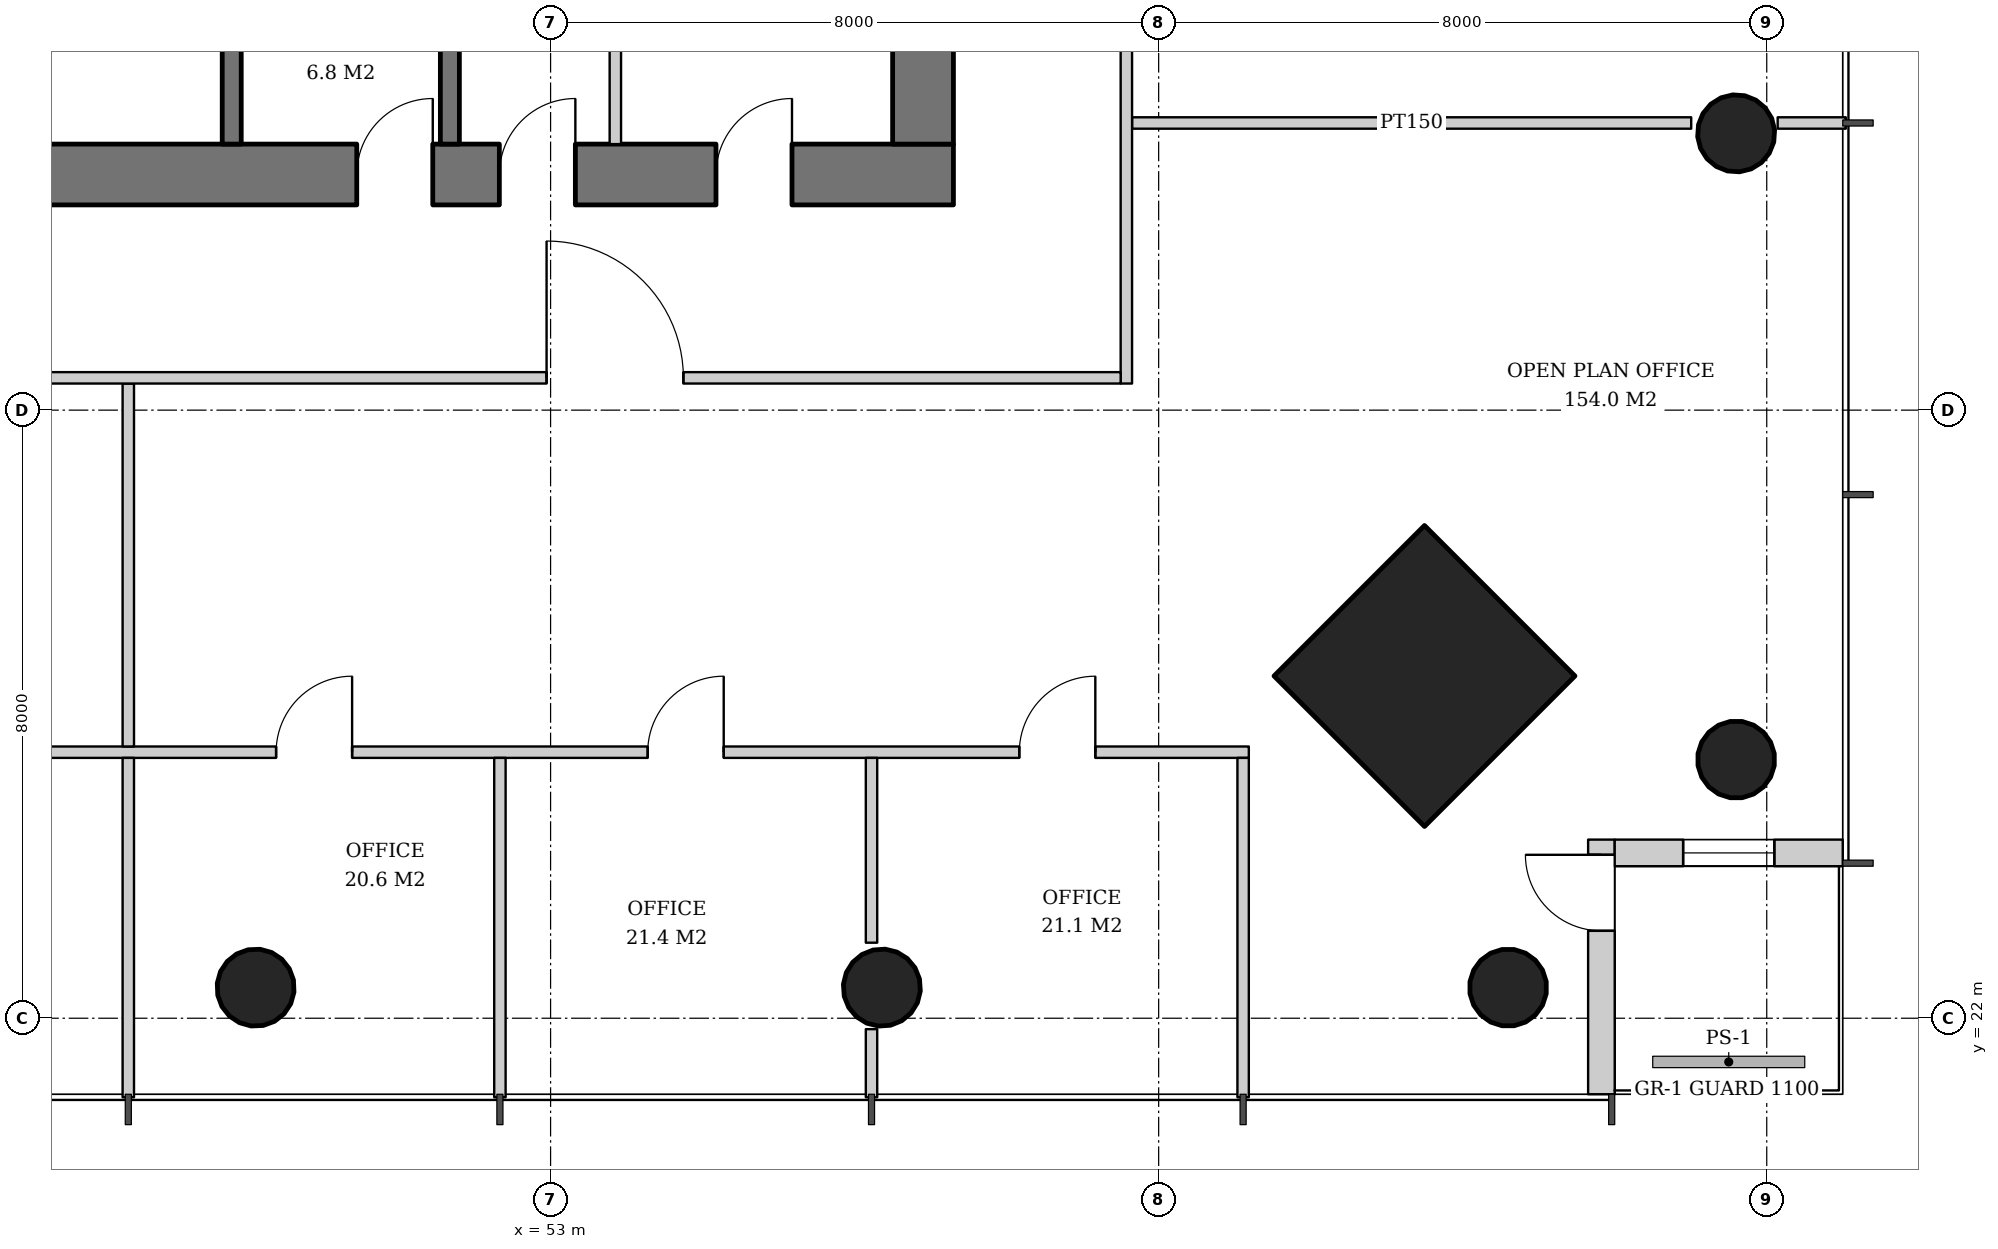
"""IFC4 building model, lengths in metres.
Left out: names, types, materials, properties, quantities, classifications, styles, units other than length and angle.
Written with IfcOpenShell. Run it as: python <this file> out.ifc"""

import sys

from ifc_helpers import new_model, si_unit, direction, frame, frame_2d, origin, origin_2d, place, context, subcontext, project, spatial, rectangle, hollow_circle, extrude, element, fill, save


model = new_model("IFC4")
c1 = context("Model", 3, precision=1e-05, world=origin(), true_north=direction((0.0, 1.0)))
c2 = subcontext(c1, "Body", "Model", "MODEL_VIEW")
j1 = project(units=[si_unit("LENGTHUNIT", "METRE"), si_unit("PLANEANGLEUNIT", "RADIAN")], contexts=[c1])
p1 = place(None, origin())
s1 = spatial("IfcSite", under=j1, at=p1, CompositionType="ELEMENT")
p2 = place(p1, origin())
s2 = spatial("IfcBuilding", under=s1, at=p2, CompositionType="ELEMENT")
p3 = place(p2, frame((0.0, 0.0, 32.4)))
s3 = spatial("IfcBuildingStorey", under=s2, at=p3, CompositionType="ELEMENT", Elevation=32.4)
p4 = place(p3, frame((68.636, 25.364, 0.0), z_axis=(-0.031898107953, 0.031898107953, 0.998981992539), x_axis=(-0.707106781187, -0.707106781187, 0.0)))
e1 = element("IfcColumn", 1, at=p4, inside=s3, PredefinedType="COLUMN", context=c2, shape_type="SweptSolid", body=[
    extrude(hollow_circle(Radius=0.508, WallThickness=0.04, at=origin_2d()), origin(), (0.0, 0.0, 1.0), 3.804),
])
p5 = place(p3, frame((68.636, 33.619, 0.0), z_axis=(-0.031908506785, 0.019132263625, 0.999307662176), x_axis=(-0.514241961696, -0.857645150882, 0.0)))
e2 = element("IfcColumn", 2, at=p5, inside=s3, PredefinedType="COLUMN", context=c2, shape_type="SweptSolid", body=[
    extrude(hollow_circle(Radius=0.508, WallThickness=0.04, at=origin_2d()), origin(), (0.0, 0.0, 1.0), 3.803),
])
p6 = place(p3, frame((64.536, 26.464, 0.0), z_axis=(-0.031898107953, 0.031898107953, 0.998981992539), x_axis=(-0.707106781187, -0.707106781187, 0.0)))
e3 = element("IfcColumn", 3, at=p6, inside=s3, PredefinedType="COLUMN", context=c2, shape_type="SweptSolid", body=[
    extrude(rectangle(XDim=2.8, YDim=2.8, at=origin_2d()), origin(), (0.0, 0.0, 1.0), 3.804),
])
p7 = place(p3, frame((65.636, 22.364, 0.0), z_axis=(-0.031898107953, 0.031898107953, 0.998981992539), x_axis=(-0.707106781187, -0.707106781187, 0.0)))
e4 = element("IfcColumn", 4, at=p7, inside=s3, PredefinedType="COLUMN", context=c2, shape_type="SweptSolid", body=[
    extrude(hollow_circle(Radius=0.508, WallThickness=0.04, at=origin_2d()), origin(), (0.0, 0.0, 1.0), 3.804),
])
p8 = place(p3, frame((49.127, 22.364, 0.0), z_axis=(-0.006421265669, 0.031913690376, 0.999470001408), x_axis=(-0.980352414563, -0.197254006954, 0.0)))
e5 = element("IfcColumn", 5, at=p8, inside=s3, PredefinedType="COLUMN", context=c2, shape_type="SweptSolid", body=[
    extrude(hollow_circle(Radius=0.508, WallThickness=0.04, at=origin_2d()), origin(), (0.0, 0.0, 1.0), 3.802),
])
p9 = place(p3, frame((57.381, 22.364, 0.0), z_axis=(-0.019132263625, 0.031908506785, 0.999307662176), x_axis=(-0.857645150882, -0.514241961696, 0.0)))
e6 = element("IfcColumn", 6, at=p9, inside=s3, PredefinedType="COLUMN", context=c2, shape_type="SweptSolid", body=[
    extrude(hollow_circle(Radius=0.508, WallThickness=0.04, at=origin_2d()), origin(), (0.0, 0.0, 1.0), 3.803),
])
p10 = place(p3, frame((31.7, 33.1, 0.0), z_axis=(0.0, 0.0, 1.0), x_axis=(1.0, 0.0, 0.0)))
e7 = element("IfcWall", 7, at=p10, inside=s3, PredefinedType="SHEAR", context=c2, shape_type="SweptSolid", body=[
    extrude(rectangle(XDim=26.6, YDim=0.8, at=frame_2d((13.3, 0.0))), origin(), (0.0, 0.0, 1.0), 3.8),
])
p11 = place(p10, frame((7.3, 0.0, 0.0)))
e8 = element("IfcOpeningElement", 8, at=p11, cuts=e7, PredefinedType="OPENING", context=c2, shape_type="SweptSolid", body=[
    extrude(rectangle(XDim=1.0, YDim=2.1, at=frame_2d((0.5, 1.05))), frame((0.0, 0.41, 0.0), z_axis=(0.0, -1.0, 0.0), x_axis=(1.0, 0.0, 0.0)), (0.0, 0.0, 1.0), 0.82),
])
p12 = place(p10, frame((18.75, 0.0, 0.0)))
e9 = element("IfcOpeningElement", 9, at=p12, cuts=e7, PredefinedType="OPENING", context=c2, shape_type="SweptSolid", body=[
    extrude(rectangle(XDim=1.0, YDim=2.1, at=frame_2d((0.5, 1.05))), frame((0.0, 0.41, 0.0), z_axis=(0.0, -1.0, 0.0), x_axis=(1.0, 0.0, 0.0)), (0.0, 0.0, 1.0), 0.82),
])
p13 = place(p10, frame((1.9, 0.0, 0.0)))
e10 = element("IfcOpeningElement", 10, at=p13, cuts=e7, PredefinedType="OPENING", context=c2, shape_type="SweptSolid", body=[
    extrude(rectangle(XDim=1.0, YDim=2.1, at=frame_2d((0.5, 1.05))), frame((0.0, 0.41, 0.0), z_axis=(0.0, -1.0, 0.0), x_axis=(1.0, 0.0, 0.0)), (0.0, 0.0, 1.0), 0.82),
])
p14 = place(p10, frame((4.725, 0.0, 0.0)))
e11 = element("IfcOpeningElement", 11, at=p14, cuts=e7, PredefinedType="OPENING", context=c2, shape_type="SweptSolid", body=[
    extrude(rectangle(XDim=1.0, YDim=2.1, at=frame_2d((0.5, 1.05))), frame((0.0, 0.41, 0.0), z_axis=(0.0, -1.0, 0.0), x_axis=(1.0, 0.0, 0.0)), (0.0, 0.0, 1.0), 0.82),
])
p15 = place(p10, frame((12.44, 0.0, 0.0)))
e12 = element("IfcOpeningElement", 12, at=p15, cuts=e7, PredefinedType="OPENING", context=c2, shape_type="SweptSolid", body=[
    extrude(rectangle(XDim=1.0, YDim=2.1, at=frame_2d((0.5, 1.05))), frame((0.0, 0.41, 0.0), z_axis=(0.0, -1.0, 0.0), x_axis=(1.0, 0.0, 0.0)), (0.0, 0.0, 1.0), 0.82),
])
p16 = place(p10, frame((20.626, 0.0, 0.0)))
e13 = element("IfcOpeningElement", 13, at=p16, cuts=e7, PredefinedType="OPENING", context=c2, shape_type="SweptSolid", body=[
    extrude(rectangle(XDim=1.0, YDim=2.1, at=frame_2d((0.5, 1.05))), frame((0.0, 0.41, 0.0), z_axis=(0.0, -1.0, 0.0), x_axis=(1.0, 0.0, 0.0)), (0.0, 0.0, 1.0), 0.82),
])
p17 = place(p10, frame((23.476, 0.0, 0.0)))
e14 = element("IfcOpeningElement", 14, at=p17, cuts=e7, PredefinedType="OPENING", context=c2, shape_type="SweptSolid", body=[
    extrude(rectangle(XDim=1.0, YDim=2.1, at=frame_2d((0.5, 1.05))), frame((0.0, 0.41, 0.0), z_axis=(0.0, -1.0, 0.0), x_axis=(1.0, 0.0, 0.0)), (0.0, 0.0, 1.0), 0.82),
])
p18 = place(p3, frame((57.9, 33.5, 0.0), z_axis=(0.0, 0.0, 1.0), x_axis=(0.0, 1.0, 0.0)))
e15 = element("IfcWall", 15, at=p18, inside=s3, PredefinedType="SHEAR", context=c2, shape_type="SweptSolid", body=[
    extrude(rectangle(XDim=25.0, YDim=0.8, at=frame_2d((12.5, 0.0))), origin(), (0.0, 0.0, 1.0), 3.8),
])
p19 = place(p18, frame((11.6, 0.0, 0.0)))
e16 = element("IfcOpeningElement", 16, at=p19, cuts=e15, PredefinedType="OPENING", context=c2, shape_type="SweptSolid", body=[
    extrude(rectangle(XDim=1.8, YDim=2.4, at=frame_2d((0.9, 1.2))), frame((0.0, 0.41, 0.0), z_axis=(0.0, -1.0, 0.0), x_axis=(1.0, 0.0, 0.0)), (0.0, 0.0, 1.0), 0.82),
])
p20 = place(p3, frame((66.825, 21.0, 0.0), z_axis=(0.0, 0.0, 1.0), x_axis=(0.0, 1.0, 0.0)))
e17 = element("IfcWall", 17, at=p20, inside=s3, PredefinedType="SOLIDWALL", context=c2, shape_type="SweptSolid", body=[
    extrude(rectangle(XDim=3.35, YDim=0.35, at=frame_2d((1.675, 0.0))), origin(), (0.0, 0.0, 1.0), 3.62),
])
p21 = place(p20, frame((2.15, 0.0, 0.0)))
e18 = element("IfcOpeningElement", 18, at=p21, cuts=e17, PredefinedType="OPENING", context=c2, shape_type="SweptSolid", body=[
    extrude(rectangle(XDim=1.0, YDim=2.4, at=frame_2d((0.5, 1.2))), frame((0.0, 0.185, 0.0), z_axis=(0.0, -1.0, 0.0), x_axis=(1.0, 0.0, 0.0)), (0.0, 0.0, 1.0), 0.37),
])
p22 = place(p3, frame((67.0, 24.175, 0.0), z_axis=(0.0, 0.0, 1.0), x_axis=(1.0, 0.0, 0.0)))
e19 = element("IfcWall", 19, at=p22, inside=s3, PredefinedType="SOLIDWALL", context=c2, shape_type="SweptSolid", body=[
    extrude(rectangle(XDim=3.0, YDim=0.35, at=frame_2d((1.5, 0.0))), origin(), (0.0, 0.0, 1.0), 3.62),
])
p23 = place(p22, frame((0.9, 0.0, 0.6)))
e20 = element("IfcOpeningElement", 20, at=p23, cuts=e19, PredefinedType="OPENING", context=c2, shape_type="SweptSolid", body=[
    extrude(rectangle(XDim=1.2, YDim=2.55, at=frame_2d((0.6, 1.275))), frame((0.0, 0.185, 0.0), z_axis=(0.0, -1.0, 0.0), x_axis=(1.0, 0.0, 0.0)), (0.0, 0.0, 1.0), 0.37),
])
for number, where, z_axis, x_axis in (
    (21, (48.805, 33.5, 0.0), (0.0, 0.0, 1.0), (0.0, 1.0, 0.0)),
    (22, (51.675, 33.5, 0.0), (0.0, 0.0, 1.0), (0.0, 1.0, 0.0)),
):
    element("IfcWall", number, at=place(p3, frame(where, z_axis=z_axis, x_axis=x_axis)), inside=s3, PredefinedType="SOLIDWALL", context=c2, shape_type="SweptSolid", body=[
        extrude(rectangle(XDim=2.6, YDim=0.25, at=frame_2d((1.3, 0.0))), origin(), (0.0, 0.0, 1.0), 3.62),
    ])
p24 = place(p3, frame((53.852, 33.5, 0.0), z_axis=(0.0, 0.0, 1.0), x_axis=(0.0, 1.0, 0.0)))
e23 = element("IfcWall", 23, at=p24, inside=s3, PredefinedType="SOLIDWALL", context=c2, shape_type="SweptSolid", body=[
    extrude(rectangle(XDim=2.6, YDim=0.15, at=frame_2d((1.3, 0.0))), origin(), (0.0, 0.0, 1.0), 3.62),
])
p25 = place(p3, frame((27.814, 25.5, 0.0), z_axis=(0.0, 0.0, 1.0), x_axis=(1.0, 0.0, 0.0)))
e24 = element("IfcWall", 24, at=p25, inside=s3, PredefinedType="PARTITIONING", context=c2, shape_type="SweptSolid", body=[
    extrude(rectangle(XDim=34.372, YDim=0.15, at=frame_2d((17.186, 0.0))), origin(), (0.0, 0.0, 1.0), 2.612),
])
p26 = place(p25, frame((2.02, 0.0, 0.0)))
e25 = element("IfcOpeningElement", 25, at=p26, cuts=e24, PredefinedType="OPENING", context=c2, shape_type="SweptSolid", body=[
    extrude(rectangle(XDim=1.0, YDim=2.1, at=frame_2d((0.5, 1.05))), frame((0.0, 0.085, 0.0), z_axis=(0.0, -1.0, 0.0), x_axis=(1.0, 0.0, 0.0)), (0.0, 0.0, 1.0), 0.17),
])
p27 = place(p25, frame((6.908, 0.0, 0.0)))
e26 = element("IfcOpeningElement", 26, at=p27, cuts=e24, PredefinedType="OPENING", context=c2, shape_type="SweptSolid", body=[
    extrude(rectangle(XDim=1.0, YDim=2.1, at=frame_2d((0.5, 1.05))), frame((0.0, 0.085, 0.0), z_axis=(0.0, -1.0, 0.0), x_axis=(1.0, 0.0, 0.0)), (0.0, 0.0, 1.0), 0.17),
])
p28 = place(p25, frame((11.797, 0.0, 0.0)))
e27 = element("IfcOpeningElement", 27, at=p28, cuts=e24, PredefinedType="OPENING", context=c2, shape_type="SweptSolid", body=[
    extrude(rectangle(XDim=1.0, YDim=2.1, at=frame_2d((0.5, 1.05))), frame((0.0, 0.085, 0.0), z_axis=(0.0, -1.0, 0.0), x_axis=(1.0, 0.0, 0.0)), (0.0, 0.0, 1.0), 0.17),
])
p29 = place(p25, frame((16.686, 0.0, 0.0)))
e28 = element("IfcOpeningElement", 28, at=p29, cuts=e24, PredefinedType="OPENING", context=c2, shape_type="SweptSolid", body=[
    extrude(rectangle(XDim=1.0, YDim=2.1, at=frame_2d((0.5, 1.05))), frame((0.0, 0.085, 0.0), z_axis=(0.0, -1.0, 0.0), x_axis=(1.0, 0.0, 0.0)), (0.0, 0.0, 1.0), 0.17),
])
p30 = place(p25, frame((21.575, 0.0, 0.0)))
e29 = element("IfcOpeningElement", 29, at=p30, cuts=e24, PredefinedType="OPENING", context=c2, shape_type="SweptSolid", body=[
    extrude(rectangle(XDim=1.0, YDim=2.1, at=frame_2d((0.5, 1.05))), frame((0.0, 0.085, 0.0), z_axis=(0.0, -1.0, 0.0), x_axis=(1.0, 0.0, 0.0)), (0.0, 0.0, 1.0), 0.17),
])
p31 = place(p25, frame((26.464, 0.0, 0.0)))
e30 = element("IfcOpeningElement", 30, at=p31, cuts=e24, PredefinedType="OPENING", context=c2, shape_type="SweptSolid", body=[
    extrude(rectangle(XDim=1.0, YDim=2.1, at=frame_2d((0.5, 1.05))), frame((0.0, 0.085, 0.0), z_axis=(0.0, -1.0, 0.0), x_axis=(1.0, 0.0, 0.0)), (0.0, 0.0, 1.0), 0.17),
])
p32 = place(p25, frame((31.353, 0.0, 0.0)))
e31 = element("IfcOpeningElement", 31, at=p32, cuts=e24, PredefinedType="OPENING", context=c2, shape_type="SweptSolid", body=[
    extrude(rectangle(XDim=1.0, YDim=2.1, at=frame_2d((0.5, 1.05))), frame((0.0, 0.085, 0.0), z_axis=(0.0, -1.0, 0.0), x_axis=(1.0, 0.0, 0.0)), (0.0, 0.0, 1.0), 0.17),
])
p33 = place(p3, frame((47.444, 25.425, 0.0), z_axis=(0.0, 0.0, 1.0), x_axis=(0.0, -1.0, 0.0)))
e32 = element("IfcWall", 32, at=p33, inside=s3, PredefinedType="PARTITIONING", context=c2, shape_type="SweptSolid", body=[
    extrude(rectangle(XDim=4.465, YDim=0.15, at=frame_2d((2.232, 0.0))), origin(), (0.0, 0.0, 1.0), 3.02),
])
p34 = place(p3, frame((52.333, 25.425, 0.0), z_axis=(0.0, 0.0, 1.0), x_axis=(0.0, -1.0, 0.0)))
e33 = element("IfcWall", 33, at=p34, inside=s3, PredefinedType="PARTITIONING", context=c2, shape_type="SweptSolid", body=[
    extrude(rectangle(XDim=4.465, YDim=0.15, at=frame_2d((2.232, 0.0))), origin(), (0.0, 0.0, 1.0), 2.85),
])
p35 = place(p3, frame((57.222, 25.425, 0.0), z_axis=(0.0, 0.0, 1.0), x_axis=(0.0, -1.0, 0.0)))
e34 = element("IfcWall", 34, at=p35, inside=s3, PredefinedType="PARTITIONING", context=c2, shape_type="SweptSolid", body=[
    extrude(rectangle(XDim=2.431, YDim=0.15, at=frame_2d((1.216, 0.0))), origin(), (0.0, 0.0, 1.0), 3.62),
])
p36 = place(p3, frame((57.222, 21.856, 0.0), z_axis=(0.0, 0.0, 1.0), x_axis=(0.0, -1.0, 0.0)))
e35 = element("IfcWall", 35, at=p36, inside=s3, PredefinedType="PARTITIONING", context=c2, shape_type="SweptSolid", body=[
    extrude(rectangle(XDim=0.896, YDim=0.15, at=frame_2d((0.448, 0.0))), origin(), (0.0, 0.0, 1.0), 3.62),
])
p37 = place(p3, frame((62.111, 25.425, 0.0), z_axis=(0.0, 0.0, 1.0), x_axis=(0.0, -1.0, 0.0)))
e36 = element("IfcWall", 36, at=p37, inside=s3, PredefinedType="PARTITIONING", context=c2, shape_type="SweptSolid", body=[
    extrude(rectangle(XDim=4.465, YDim=0.15, at=frame_2d((2.232, 0.0))), origin(), (0.0, 0.0, 1.0), 3.02),
])
p38 = place(p3, frame((60.65, 33.778, 0.0), z_axis=(0.0, 0.0, 1.0), x_axis=(1.0, 0.0, 0.0)))
e37 = element("IfcWall", 37, at=p38, inside=s3, PredefinedType="PARTITIONING", context=c2, shape_type="SweptSolid", body=[
    extrude(rectangle(XDim=7.356, YDim=0.15, at=frame_2d((3.678, 0.0))), origin(), (0.0, 0.0, 1.0), 3.62),
])
p39 = place(p3, frame((69.144, 33.778, 0.0), z_axis=(0.0, 0.0, 1.0), x_axis=(1.0, 0.0, 0.0)))
e38 = element("IfcWall", 38, at=p39, inside=s3, PredefinedType="PARTITIONING", context=c2, shape_type="SweptSolid", body=[
    extrude(rectangle(XDim=0.896, YDim=0.15, at=frame_2d((0.448, 0.0))), origin(), (0.0, 0.0, 1.0), 3.62),
])
p40 = place(p3, frame((47.444, 30.35, 0.0), z_axis=(0.0, 0.0, 1.0), x_axis=(0.0, -1.0, 0.0)))
e39 = element("IfcWall", 39, at=p40, inside=s3, PredefinedType="PARTITIONING", context=c2, shape_type="SweptSolid", body=[
    extrude(rectangle(XDim=4.775, YDim=0.15, at=frame_2d((2.388, 0.0))), origin(), (0.0, 0.0, 1.0), 3.62),
])
p41 = place(p3, frame((60.575, 30.35, 0.0), z_axis=(0.0, 0.0, 1.0), x_axis=(0.0, 1.0, 0.0)))
e40 = element("IfcWall", 40, at=p41, inside=s3, PredefinedType="PARTITIONING", context=c2, shape_type="SweptSolid", body=[
    extrude(rectangle(XDim=31.15, YDim=0.15, at=frame_2d((15.575, 0.0))), origin(), (0.0, 0.0, 1.0), 2.612),
])
p42 = place(p41, frame((16.264, 0.0, 0.0)))
e41 = element("IfcOpeningElement", 41, at=p42, cuts=e40, PredefinedType="OPENING", context=c2, shape_type="SweptSolid", body=[
    extrude(rectangle(XDim=1.8, YDim=2.4, at=frame_2d((0.9, 1.2))), frame((0.0, 0.085, 0.0), z_axis=(0.0, -1.0, 0.0), x_axis=(1.0, 0.0, 0.0)), (0.0, 0.0, 1.0), 0.17),
])
p43 = place(p3, frame((29.35, 30.425, 0.0), z_axis=(0.0, 0.0, 1.0), x_axis=(1.0, 0.0, 0.0)))
e42 = element("IfcWall", 42, at=p43, inside=s3, PredefinedType="PARTITIONING", context=c2, shape_type="SweptSolid", body=[
    extrude(rectangle(XDim=31.15, YDim=0.15, at=frame_2d((15.575, 0.0))), origin(), (0.0, 0.0, 1.0), 2.612),
])
p44 = place(p43, frame((23.597, 0.0, 0.0)))
e43 = element("IfcOpeningElement", 43, at=p44, cuts=e42, PredefinedType="OPENING", context=c2, shape_type="SweptSolid", body=[
    extrude(rectangle(XDim=1.8, YDim=2.4, at=frame_2d((0.9, 1.2))), frame((0.0, 0.085, 0.0), z_axis=(0.0, -1.0, 0.0), x_axis=(1.0, 0.0, 0.0)), (0.0, 0.0, 1.0), 0.17),
])
p45 = place(p21, origin())
e44 = element("IfcDoor", 44, at=p45, inside=s3, OperationType="SINGLE_SWING_RIGHT", PredefinedType="DOOR", context=c2, shape_type="SweptSolid", body=[
    extrude(rectangle(XDim=1.0, YDim=2.4, at=frame_2d((0.5, 1.2))), frame((0.0, 0.025, 0.0), z_axis=(0.0, -1.0, 0.0), x_axis=(1.0, 0.0, 0.0)), (0.0, 0.0, 1.0), 0.05),
])
fill(e18, e44)
p46 = place(p23, origin())
e45 = element("IfcWindow", 45, at=p46, inside=s3, PartitioningType="SINGLE_PANEL", PredefinedType="WINDOW", context=c2, shape_type="SweptSolid", body=[
    extrude(rectangle(XDim=1.2, YDim=2.55, at=frame_2d((0.6, 1.275))), frame((0.0, 0.03, 0.0), z_axis=(0.0, -1.0, 0.0), x_axis=(1.0, 0.0, 0.0)), (0.0, 0.0, 1.0), 0.06),
])
fill(e20, e45)
p47 = place(p12, origin())
e46 = element("IfcDoor", 46, at=p47, inside=s3, OperationType="SINGLE_SWING_RIGHT", PredefinedType="DOOR", context=c2, shape_type="SweptSolid", body=[
    extrude(rectangle(XDim=1.0, YDim=2.1, at=frame_2d((0.5, 1.05))), frame((0.0, 0.025, 0.0), z_axis=(0.0, -1.0, 0.0), x_axis=(1.0, 0.0, 0.0)), (0.0, 0.0, 1.0), 0.05),
])
fill(e9, e46)
p48 = place(p16, origin())
e47 = element("IfcDoor", 47, at=p48, inside=s3, OperationType="SINGLE_SWING_RIGHT", PredefinedType="DOOR", context=c2, shape_type="SweptSolid", body=[
    extrude(rectangle(XDim=1.0, YDim=2.1, at=frame_2d((0.5, 1.05))), frame((0.0, 0.39, 0.0), z_axis=(0.0, -1.0, 0.0), x_axis=(1.0, 0.0, 0.0)), (0.0, 0.0, 1.0), 0.05),
])
fill(e13, e47)
p49 = place(p17, origin())
e48 = element("IfcDoor", 48, at=p49, inside=s3, OperationType="SINGLE_SWING_RIGHT", PredefinedType="DOOR", context=c2, shape_type="SweptSolid", body=[
    extrude(rectangle(XDim=1.0, YDim=2.1, at=frame_2d((0.5, 1.05))), frame((0.0, 0.39, 0.0), z_axis=(0.0, -1.0, 0.0), x_axis=(1.0, 0.0, 0.0)), (0.0, 0.0, 1.0), 0.05),
])
fill(e14, e48)
p50 = place(p30, origin())
e49 = element("IfcDoor", 49, at=p50, inside=s3, OperationType="SINGLE_SWING_RIGHT", PredefinedType="DOOR", context=c2, shape_type="SweptSolid", body=[
    extrude(rectangle(XDim=1.0, YDim=2.1, at=frame_2d((0.5, 1.05))), frame((0.0, 0.025, 0.0), z_axis=(0.0, -1.0, 0.0), x_axis=(1.0, 0.0, 0.0)), (0.0, 0.0, 1.0), 0.05),
])
fill(e29, e49)
p51 = place(p31, origin())
e50 = element("IfcDoor", 50, at=p51, inside=s3, OperationType="SINGLE_SWING_RIGHT", PredefinedType="DOOR", context=c2, shape_type="SweptSolid", body=[
    extrude(rectangle(XDim=1.0, YDim=2.1, at=frame_2d((0.5, 1.05))), frame((0.0, 0.025, 0.0), z_axis=(0.0, -1.0, 0.0), x_axis=(1.0, 0.0, 0.0)), (0.0, 0.0, 1.0), 0.05),
])
fill(e30, e50)
p52 = place(p32, origin())
e51 = element("IfcDoor", 51, at=p52, inside=s3, OperationType="SINGLE_SWING_RIGHT", PredefinedType="DOOR", context=c2, shape_type="SweptSolid", body=[
    extrude(rectangle(XDim=1.0, YDim=2.1, at=frame_2d((0.5, 1.05))), frame((0.0, 0.025, 0.0), z_axis=(0.0, -1.0, 0.0), x_axis=(1.0, 0.0, 0.0)), (0.0, 0.0, 1.0), 0.05),
])
fill(e31, e51)
p53 = place(p44, origin())
e52 = element("IfcDoor", 52, at=p53, inside=s3, OperationType="DOUBLE_DOOR_SINGLE_SWING", PredefinedType="DOOR", context=c2, shape_type="SweptSolid", body=[
    extrude(rectangle(XDim=1.8, YDim=2.4, at=frame_2d((0.9, 1.2))), frame((0.0, 0.025, 0.0), z_axis=(0.0, -1.0, 0.0), x_axis=(1.0, 0.0, 0.0)), (0.0, 0.0, 1.0), 0.05),
])
fill(e43, e52)
save(model, sys.argv[1])
